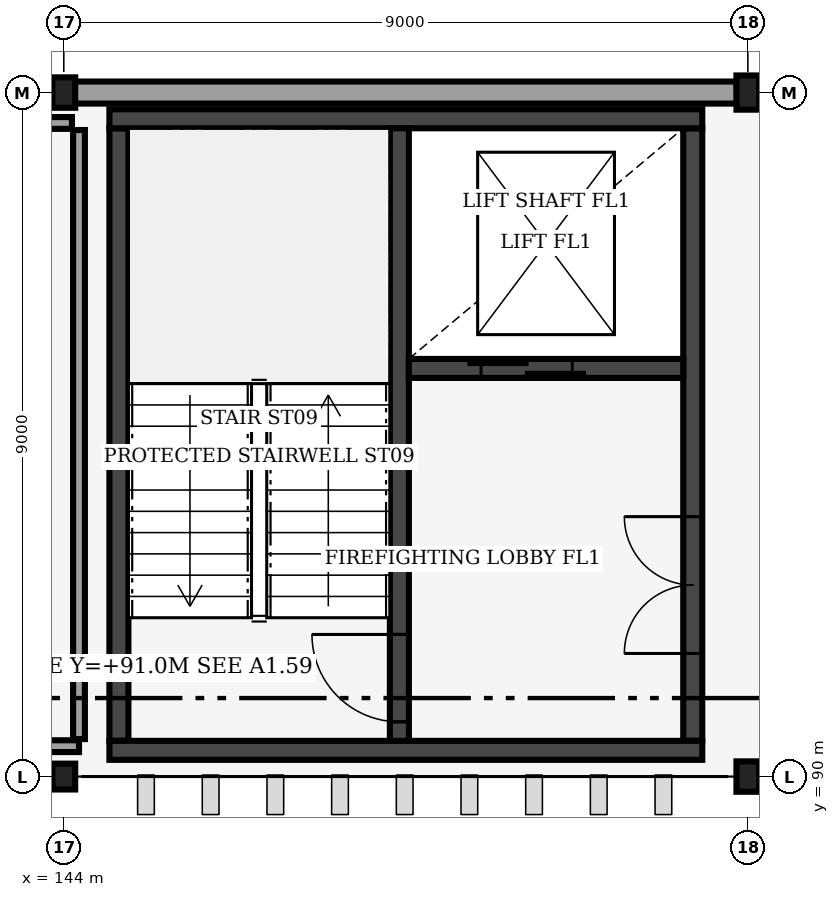
"""IFC4 building model, lengths in metres.
Left out: names, types, materials, properties, quantities, classifications, styles, units other than length and angle.
Written with IfcOpenShell. Run it as: python <this file> out.ifc"""

import sys

from ifc_helpers import new_model, si_unit, direction, frame, frame_2d, origin, origin_2d, place, context, subcontext, project, spatial, rectangle, i_section, extrude, element, fill, save


model = new_model("IFC4")
c1 = context("Model", 3, precision=1e-05, world=origin(), true_north=direction((0.0, 1.0)))
c2 = subcontext(c1, "Body", "Model", "MODEL_VIEW")
j1 = project(units=[si_unit("LENGTHUNIT", "METRE"), si_unit("PLANEANGLEUNIT", "RADIAN")], contexts=[c1])
p1 = place(None, origin())
s1 = spatial("IfcSite", under=j1, at=p1, CompositionType="ELEMENT")
p2 = place(p1, origin())
s2 = spatial("IfcBuilding", under=s1, at=p2, CompositionType="ELEMENT")
p3 = place(p2, frame((0.0, 0.0, 22.8)))
s3 = spatial("IfcBuildingStorey", under=s2, at=p3, CompositionType="ELEMENT", Elevation=22.8)
p4 = place(p3, frame((144.0, 90.0, 0.0), z_axis=(0.0, 0.0, 1.0), x_axis=(1.0, 0.0, 0.0)))
e1 = element("IfcColumn", 1, at=p4, inside=s3, PredefinedType="COLUMN", context=c2, shape_type="SweptSolid", body=[
    extrude(i_section(OverallWidth=0.3, OverallDepth=0.34, WebThickness=0.012, FlangeThickness=0.021, FilletRadius=0.027, at=origin_2d()), origin(), (0.0, 0.0, 1.0), 4.0),
])
for number, where, z_axis, x_axis in (
    (2, (144.0, 99.0, 0.0), (0.0, 0.0, 1.0), (1.0, 0.0, 0.0)),
    (3, (153.0, 90.0, 0.0), (0.0, 0.0, 1.0), (1.0, 0.0, 0.0)),
):
    element("IfcColumn", number, at=place(p3, frame(where, z_axis=z_axis, x_axis=x_axis)), inside=s3, PredefinedType="COLUMN", context=c2, shape_type="SweptSolid", body=[
        extrude(i_section(OverallWidth=0.3, OverallDepth=0.4, WebThickness=0.013, FlangeThickness=0.024, FilletRadius=0.027, at=origin_2d()), origin(), (0.0, 0.0, 1.0), 4.0),
    ])
p5 = place(p3, frame((153.0, 99.0, 0.0), z_axis=(0.0, 0.0, 1.0), x_axis=(1.0, 0.0, 0.0)))
e4 = element("IfcColumn", 4, at=p5, inside=s3, PredefinedType="COLUMN", context=c2, shape_type="SweptSolid", body=[
    extrude(i_section(OverallWidth=0.3, OverallDepth=0.45, WebThickness=0.014, FlangeThickness=0.026, FilletRadius=0.027, at=origin_2d()), origin(), (0.0, 0.0, 1.0), 4.0),
])
p6 = place(p3, frame((144.145, 99.0, 0.0), z_axis=(0.0, 0.0, 1.0), x_axis=(1.0, 0.0, 0.0)))
e5 = element("IfcWall", 5, at=p6, inside=s3, PredefinedType="SOLIDWALL", context=c2, shape_type="SweptSolid", body=[
    extrude(rectangle(XDim=8.71, YDim=0.29, at=frame_2d((4.355, 0.0))), origin(), (0.0, 0.0, 1.0), 2.85),
])
p7 = place(p3, frame((144.725, 90.47, 0.0), z_axis=(0.0, 0.0, 1.0), x_axis=(0.0, 1.0, 0.0)))
e6 = element("IfcWall", 6, at=p7, inside=s3, PredefinedType="SHEAR", context=c2, shape_type="SweptSolid", body=[
    extrude(rectangle(XDim=8.06, YDim=0.25, at=frame_2d((4.03, 0.0))), origin(), (0.0, 0.0, 1.0), 3.64),
])
p8 = place(p3, frame((152.275, 90.47, 0.0), z_axis=(0.0, 0.0, 1.0), x_axis=(0.0, 1.0, 0.0)))
e7 = element("IfcWall", 7, at=p8, inside=s3, PredefinedType="SHEAR", context=c2, shape_type="SweptSolid", body=[
    extrude(rectangle(XDim=8.06, YDim=0.25, at=frame_2d((4.03, 0.0))), origin(), (0.0, 0.0, 1.0), 3.64),
])
p9 = place(p8, frame((1.15, 0.0, 0.0)))
e8 = element("IfcOpeningElement", 8, at=p9, cuts=e7, PredefinedType="OPENING", context=c2, shape_type="SweptSolid", body=[
    extrude(rectangle(XDim=1.8, YDim=2.2, at=frame_2d((0.9, 1.1))), frame((0.0, 0.135, 0.0), z_axis=(0.0, -1.0, 0.0), x_axis=(1.0, 0.0, 0.0)), (0.0, 0.0, 1.0), 0.27),
])
for number, where, z_axis, x_axis in (
    (9, (144.6, 90.345, 0.0), (0.0, 0.0, 1.0), (1.0, 0.0, 0.0)),
    (10, (144.6, 98.655, 0.0), (0.0, 0.0, 1.0), (1.0, 0.0, 0.0)),
):
    element("IfcWall", number, at=place(p3, frame(where, z_axis=z_axis, x_axis=x_axis)), inside=s3, PredefinedType="SHEAR", context=c2, shape_type="SweptSolid", body=[
        extrude(rectangle(XDim=7.8, YDim=0.25, at=frame_2d((3.9, 0.0))), origin(), (0.0, 0.0, 1.0), 3.64),
    ])
p10 = place(p3, frame((148.415, 90.47, 0.0), z_axis=(0.0, 0.0, 1.0), x_axis=(0.0, 1.0, 0.0)))
e11 = element("IfcWall", 11, at=p10, inside=s3, PredefinedType="SHEAR", context=c2, shape_type="SweptSolid", body=[
    extrude(rectangle(XDim=8.06, YDim=0.25, at=frame_2d((4.03, 0.0))), origin(), (0.0, 0.0, 1.0), 3.64),
])
p11 = place(p10, frame((0.25, 0.0, 0.0)))
e12 = element("IfcOpeningElement", 12, at=p11, cuts=e11, PredefinedType="OPENING", context=c2, shape_type="SweptSolid", body=[
    extrude(rectangle(XDim=1.15, YDim=2.15, at=frame_2d((0.575, 1.075))), frame((0.0, 0.135, 0.0), z_axis=(0.0, -1.0, 0.0), x_axis=(1.0, 0.0, 0.0)), (0.0, 0.0, 1.0), 0.27),
])
p12 = place(p3, frame((148.54, 95.37, 0.0), z_axis=(0.0, 0.0, 1.0), x_axis=(1.0, 0.0, 0.0)))
e13 = element("IfcWall", 13, at=p12, inside=s3, PredefinedType="SHEAR", context=c2, shape_type="SweptSolid", body=[
    extrude(rectangle(XDim=3.61, YDim=0.25, at=frame_2d((1.805, 0.0))), origin(), (0.0, 0.0, 1.0), 3.64),
])
p13 = place(p12, frame((0.95, 0.0, 0.0)))
e14 = element("IfcOpeningElement", 14, at=p13, cuts=e13, PredefinedType="OPENING", context=c2, shape_type="SweptSolid", body=[
    extrude(rectangle(XDim=1.2, YDim=2.2, at=frame_2d((0.6, 1.1))), frame((0.0, 0.135, 0.0), z_axis=(0.0, -1.0, 0.0), x_axis=(1.0, 0.0, 0.0)), (0.0, 0.0, 1.0), 0.27),
])
p14 = place(p3, frame((131.0, 90.4, 0.0), z_axis=(0.0, 0.0, 1.0), x_axis=(1.0, 0.0, 0.0)))
e15 = element("IfcWall", 15, at=p14, inside=s3, PredefinedType="PARTITIONING", context=c2, shape_type="SweptSolid", body=[
    extrude(rectangle(XDim=13.2, YDim=0.155, at=frame_2d((6.6, 0.0))), origin(), (0.0, 0.0, 1.0), 2.8),
])
p15 = place(p14, frame((0.25, 0.0, 0.0)))
e16 = element("IfcOpeningElement", 16, at=p15, cuts=e15, PredefinedType="OPENING", context=c2, shape_type="SweptSolid", body=[
    extrude(rectangle(XDim=1.08, YDim=2.18, at=frame_2d((0.54, 1.09))), frame((0.0, 0.087, 0.0), z_axis=(0.0, -1.0, 0.0), x_axis=(1.0, 0.0, 0.0)), (0.0, 0.0, 1.0), 0.175),
])
p16 = place(p3, frame((131.093, 98.6, 0.0), z_axis=(0.0, 0.0, 1.0), x_axis=(1.0, 0.0, 0.0)))
e17 = element("IfcWall", 17, at=p16, inside=s3, PredefinedType="PARTITIONING", context=c2, shape_type="SweptSolid", body=[
    extrude(rectangle(XDim=13.014, YDim=0.155, at=frame_2d((6.507, 0.0))), origin(), (0.0, 0.0, 1.0), 2.8),
])
p17 = place(p3, frame((144.2, 90.493, 0.0), z_axis=(0.0, 0.0, 1.0), x_axis=(0.0, 1.0, 0.0)))
e18 = element("IfcWall", 18, at=p17, inside=s3, PredefinedType="PARTITIONING", context=c2, shape_type="SweptSolid", body=[
    extrude(rectangle(XDim=8.014, YDim=0.155, at=frame_2d((4.007, 0.0))), origin(), (0.0, 0.0, 1.0), 2.8),
])
p18 = place(p11, origin())
e19 = element("IfcDoor", 19, at=p18, inside=s3, OperationType="SINGLE_SWING_RIGHT", PredefinedType="DOOR", context=c2, shape_type="SweptSolid", body=[
    extrude(rectangle(XDim=1.15, YDim=2.15, at=frame_2d((0.575, 1.075))), frame((0.0, 0.025, 0.0), z_axis=(0.0, -1.0, 0.0), x_axis=(1.0, 0.0, 0.0)), (0.0, 0.0, 1.0), 0.05),
])
fill(e12, e19)
p19 = place(p13, origin())
e20 = element("IfcDoor", 20, at=p19, inside=s3, OperationType="DOUBLE_DOOR_SLIDING", PredefinedType="DOOR", context=c2, shape_type="SweptSolid", body=[
    extrude(rectangle(XDim=1.2, YDim=2.2, at=frame_2d((0.6, 1.1))), frame((0.0, 0.025, 0.0), z_axis=(0.0, -1.0, 0.0), x_axis=(1.0, 0.0, 0.0)), (0.0, 0.0, 1.0), 0.05),
])
fill(e14, e20)
p20 = place(p9, origin())
e21 = element("IfcDoor", 21, at=p20, inside=s3, OperationType="DOUBLE_DOOR_SINGLE_SWING", PredefinedType="DOOR", context=c2, shape_type="SweptSolid", body=[
    extrude(rectangle(XDim=1.8, YDim=2.2, at=frame_2d((0.9, 1.1))), frame((0.0, 0.025, 0.0), z_axis=(0.0, -1.0, 0.0), x_axis=(1.0, 0.0, 0.0)), (0.0, 0.0, 1.0), 0.05),
])
fill(e8, e21)
save(model, sys.argv[1])
